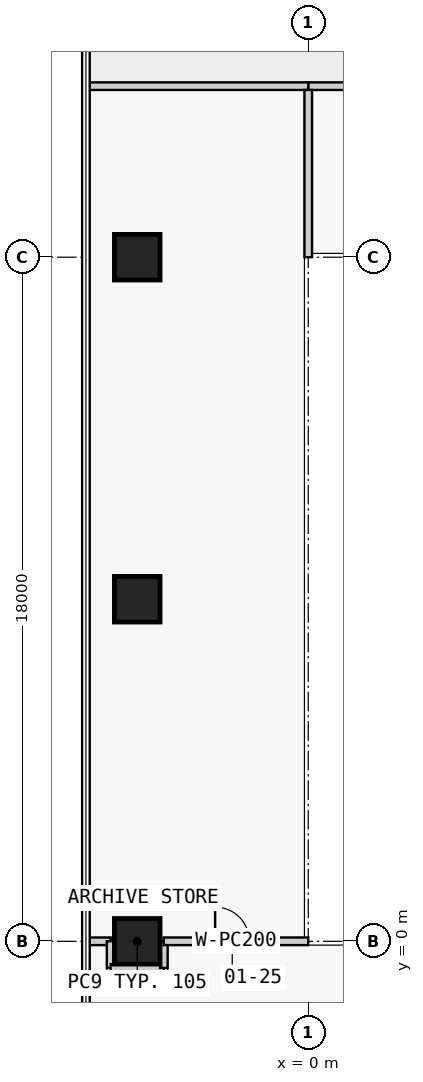
"""IFC4 building model, lengths in metres.
Left out: names, types, materials, properties, quantities, classifications, styles, units other than length and angle.
Written with IfcOpenShell. Run it as: python <this file> out.ifc"""

import sys

from ifc_helpers import new_model, si_unit, direction, frame, frame_2d, origin, origin_2d, place, context, subcontext, project, spatial, rectangle, extrude, element, fill, save


model = new_model("IFC4")
c1 = context("Model", 3, precision=1e-05, world=origin(), true_north=direction((0.0, 1.0)))
c2 = subcontext(c1, "Body", "Model", "MODEL_VIEW")
j1 = project(units=[si_unit("LENGTHUNIT", "METRE"), si_unit("PLANEANGLEUNIT", "RADIAN")], contexts=[c1])
p1 = place(None, origin())
s1 = spatial("IfcSite", under=j1, at=p1, CompositionType="ELEMENT")
p2 = place(p1, origin())
s2 = spatial("IfcBuilding", under=s1, at=p2, CompositionType="ELEMENT")
p3 = place(p2, frame((0.0, 0.0, 8.0)))
s3 = spatial("IfcBuildingStorey", under=s2, at=p3, CompositionType="ELEMENT", Elevation=8.0)
for number, where, z_axis, x_axis in (
    (1, (-4.5, 0.0, 0.0), (0.0, 0.0, 1.0), (1.0, 0.0, 0.0)),
    (2, (-4.5, 9.0, 0.0), (0.0, 0.0, 1.0), (1.0, 0.0, 0.0)),
    (3, (-4.5, 18.0, 0.0), (0.0, 0.0, 1.0), (1.0, 0.0, 0.0)),
):
    element("IfcColumn", number, at=place(p3, frame(where, z_axis=z_axis, x_axis=x_axis)), inside=s3, PredefinedType="COLUMN", context=c2, shape_type="SweptSolid", body=[
        extrude(rectangle(XDim=1.2, YDim=1.2, at=origin_2d()), origin(), (0.0, 0.0, 1.0), 4.8),
    ])
p4 = place(p3, frame((0.0, 22.5, 0.0), z_axis=(0.0, 0.0, 1.0), x_axis=(1.0, 0.0, 0.0)))
e4 = element("IfcWall", 4, at=p4, inside=s3, PredefinedType="PARTITIONING", context=c2, shape_type="SweptSolid", body=[
    extrude(rectangle(XDim=22.5, YDim=0.2, at=frame_2d((11.25, 0.0))), origin(), (0.0, 0.0, 1.0), 4.45),
])
p5 = place(p4, frame((10.35, 0.0, 0.0)))
e5 = element("IfcOpeningElement", 5, at=p5, cuts=e4, PredefinedType="OPENING", context=c2, shape_type="SweptSolid", body=[
    extrude(rectangle(XDim=1.8, YDim=2.1, at=frame_2d((0.9, 1.05))), frame((0.0, 0.11, 0.0), z_axis=(0.0, -1.0, 0.0), x_axis=(1.0, 0.0, 0.0)), (0.0, 0.0, 1.0), 0.22),
])
p6 = place(p3, frame((-5.85, 0.0, 0.0), z_axis=(0.0, 0.0, 1.0), x_axis=(1.0, 0.0, 0.0)))
e6 = element("IfcWall", 6, at=p6, inside=s3, PredefinedType="PARTITIONING", context=c2, shape_type="SweptSolid", body=[
    extrude(rectangle(XDim=0.65, YDim=0.2, at=frame_2d((0.325, 0.0))), origin(), (0.0, 0.0, 1.0), 4.45),
])
p7 = place(p3, frame((-5.2, 0.0, 0.0), z_axis=(0.0, 0.0, 1.0), x_axis=(0.0, -1.0, 0.0)))
e7 = element("IfcWall", 7, at=p7, inside=s3, PredefinedType="PARTITIONING", context=c2, shape_type="SweptSolid", body=[
    extrude(rectangle(XDim=0.7, YDim=0.2, at=frame_2d((0.35, 0.0))), origin(), (0.0, 0.0, 1.0), 4.45),
])
p8 = place(p3, frame((-5.2, -0.7, 0.0), z_axis=(0.0, 0.0, 1.0), x_axis=(1.0, 0.0, 0.0)))
e8 = element("IfcWall", 8, at=p8, inside=s3, PredefinedType="PARTITIONING", context=c2, shape_type="SweptSolid", body=[
    extrude(rectangle(XDim=1.4, YDim=0.2, at=frame_2d((0.7, 0.0))), origin(), (0.0, 0.0, 1.0), 3.75),
])
p9 = place(p3, frame((-3.8, -0.7, 0.0), z_axis=(0.0, 0.0, 1.0), x_axis=(0.0, 1.0, 0.0)))
e9 = element("IfcWall", 9, at=p9, inside=s3, PredefinedType="PARTITIONING", context=c2, shape_type="SweptSolid", body=[
    extrude(rectangle(XDim=0.7, YDim=0.2, at=frame_2d((0.35, 0.0))), origin(), (0.0, 0.0, 1.0), 4.45),
])
p10 = place(p3, frame((-3.8, 0.0, 0.0), z_axis=(0.0, 0.0, 1.0), x_axis=(1.0, 0.0, 0.0)))
e10 = element("IfcWall", 10, at=p10, inside=s3, PredefinedType="PARTITIONING", context=c2, shape_type="SweptSolid", body=[
    extrude(rectangle(XDim=3.8, YDim=0.2, at=frame_2d((1.9, 0.0))), origin(), (0.0, 0.0, 1.0), 4.45),
])
p11 = place(p10, frame((1.35, 0.0, 0.0)))
e11 = element("IfcOpeningElement", 11, at=p11, cuts=e10, PredefinedType="OPENING", context=c2, shape_type="SweptSolid", body=[
    extrude(rectangle(XDim=0.9, YDim=2.1, at=frame_2d((0.45, 1.05))), frame((0.0, 0.11, 0.0), z_axis=(0.0, -1.0, 0.0), x_axis=(1.0, 0.0, 0.0)), (0.0, 0.0, 1.0), 0.22),
])
p12 = place(p3, frame((0.0, 22.5, 0.0), z_axis=(0.0, 0.0, 1.0), x_axis=(-1.0, 0.0, 0.0)))
e12 = element("IfcWall", 12, at=p12, inside=s3, PredefinedType="PARTITIONING", context=c2, shape_type="SweptSolid", body=[
    extrude(rectangle(XDim=5.85, YDim=0.2, at=frame_2d((2.925, 0.0))), origin(), (0.0, 0.0, 1.0), 3.75),
])
p13 = place(p3, frame((0.0, 18.0, 0.0), z_axis=(0.0, 0.0, 1.0), x_axis=(0.0, 1.0, 0.0)))
e13 = element("IfcWall", 13, at=p13, inside=s3, PredefinedType="PARTITIONING", context=c2, shape_type="SweptSolid", body=[
    extrude(rectangle(XDim=4.4, YDim=0.2, at=frame_2d((2.2, 0.0))), origin(), (0.0, 0.0, 1.0), 4.45),
])
p14 = place(p11, origin())
e14 = element("IfcDoor", 14, at=p14, inside=s3, OperationType="SINGLE_SWING_LEFT", PredefinedType="DOOR", context=c2, shape_type="SweptSolid", body=[
    extrude(rectangle(XDim=0.9, YDim=2.1, at=frame_2d((0.45, 1.05))), frame((0.0, 0.025, 0.0), z_axis=(0.0, -1.0, 0.0), x_axis=(1.0, 0.0, 0.0)), (0.0, 0.0, 1.0), 0.05),
])
fill(e11, e14)
save(model, sys.argv[1])
